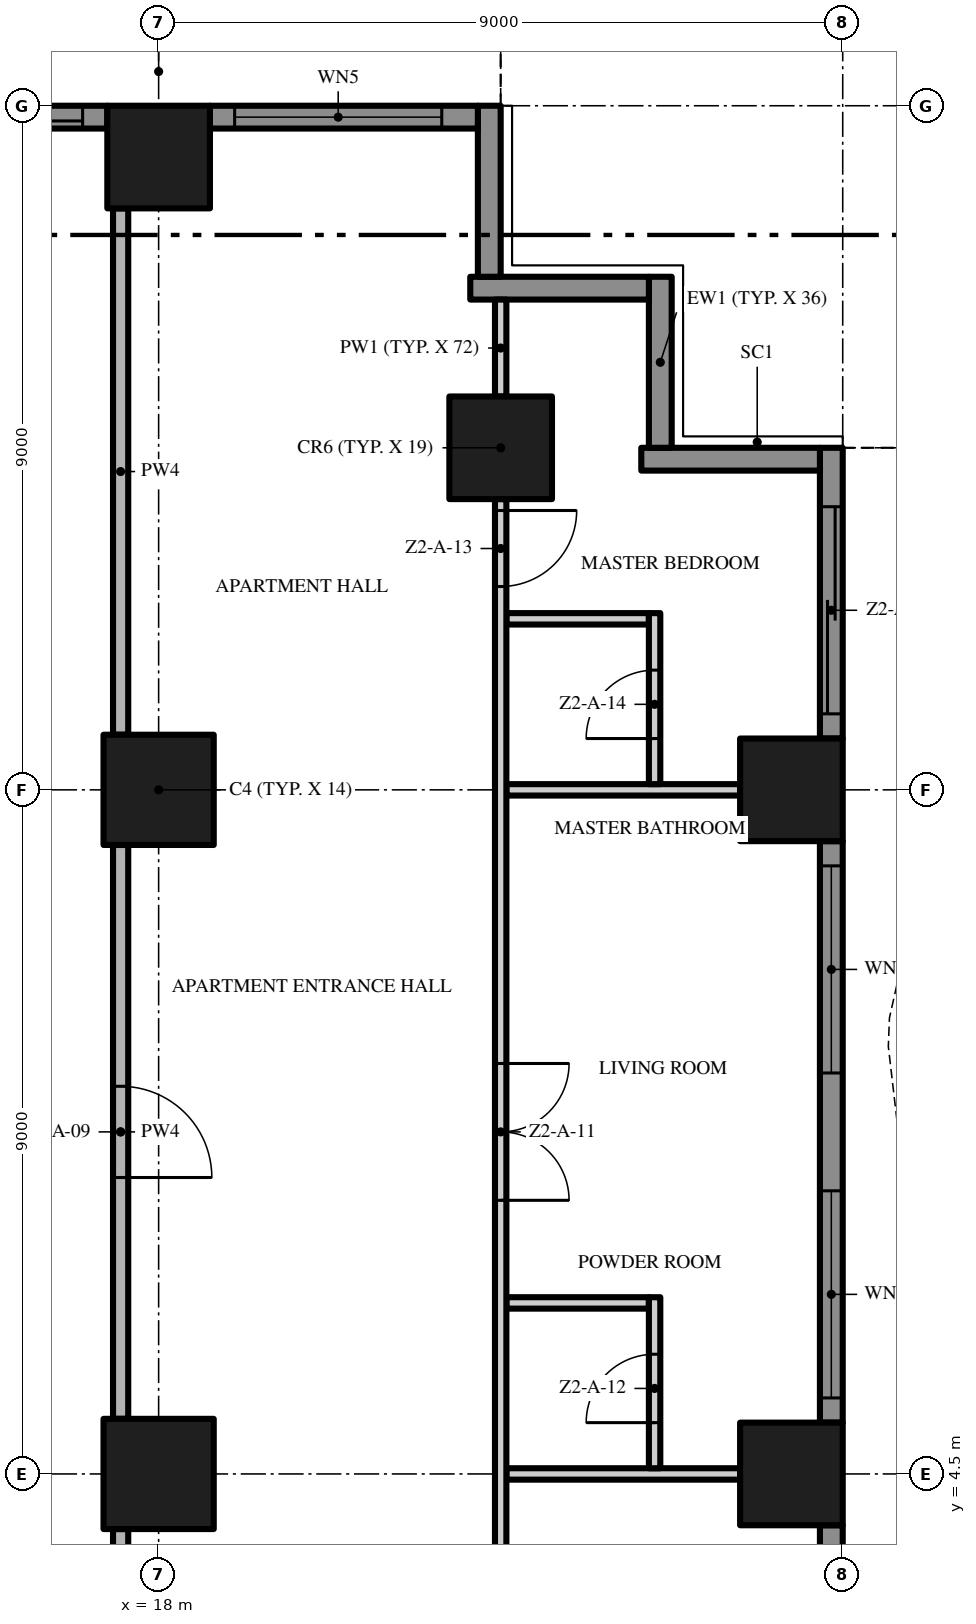
"""IFC4 building model, lengths in metres.
Left out: names, types, materials, properties, quantities, classifications, styles, units other than length and angle.
Written with IfcOpenShell. Run it as: python <this file> out.ifc"""

import sys

from ifc_helpers import new_model, si_unit, direction, frame, frame_2d, origin, origin_2d, place, context, subcontext, project, spatial, polyline, rectangle, outline, extrude, element, fill, save


model = new_model("IFC4")
c1 = context("Model", 3, precision=1e-05, world=origin(), true_north=direction((0.0, 1.0)))
c2 = subcontext(c1, "Body", "Model", "MODEL_VIEW")
j1 = project(units=[si_unit("LENGTHUNIT", "METRE"), si_unit("PLANEANGLEUNIT", "RADIAN")], contexts=[c1])
p1 = place(None, origin())
s1 = spatial("IfcSite", under=j1, at=p1, CompositionType="ELEMENT")
p2 = place(p1, origin())
s2 = spatial("IfcBuilding", under=s1, at=p2, CompositionType="ELEMENT")
p3 = place(p2, frame((0.0, 0.0, 73.2)))
s3 = spatial("IfcBuildingStorey", under=s2, at=p3, CompositionType="ELEMENT", Elevation=73.2)
p4 = place(p3, frame((18.0, 13.5, 0.0), z_axis=(0.0, 0.0, 1.0), x_axis=(1.0, 0.0, 0.0)))
e1 = element("IfcColumn", 1, at=p4, inside=s3, PredefinedType="COLUMN", context=c2, shape_type="SweptSolid", body=[
    extrude(rectangle(XDim=1.45, YDim=1.45, at=origin_2d()), origin(), (0.0, 0.0, 1.0), 3.5),
])
p5 = place(p3, frame((18.0, 21.825, 0.0), z_axis=(0.0, 0.0, 1.0), x_axis=(1.0, 0.0, 0.0)))
e2 = element("IfcColumn", 2, at=p5, inside=s3, PredefinedType="COLUMN", context=c2, shape_type="SweptSolid", body=[
    extrude(rectangle(XDim=1.35, YDim=1.35, at=origin_2d()), origin(), (0.0, 0.0, 1.0), 3.5),
])
p6 = place(p3, frame((18.0, 4.5, 0.0), z_axis=(0.0, 0.0, 1.0), x_axis=(1.0, 0.0, 0.0)))
e3 = element("IfcColumn", 3, at=p6, inside=s3, PredefinedType="COLUMN", context=c2, shape_type="SweptSolid", body=[
    extrude(rectangle(XDim=1.45, YDim=1.45, at=origin_2d()), origin(), (0.0, 0.0, 1.0), 3.5),
])
for number, where, z_axis, x_axis in (
    (4, (26.325, 13.5, 0.0), (0.0, 0.0, 1.0), (1.0, 0.0, 0.0)),
    (5, (22.5, 18.0, 0.0), (0.0, 0.0, 1.0), (1.0, 0.0, 0.0)),
    (6, (26.325, 4.5, 0.0), (0.0, 0.0, 1.0), (1.0, 0.0, 0.0)),
):
    element("IfcColumn", number, at=place(p3, frame(where, z_axis=z_axis, x_axis=x_axis)), inside=s3, PredefinedType="COLUMN", context=c2, shape_type="SweptSolid", body=[
        extrude(rectangle(XDim=1.35, YDim=1.35, at=origin_2d()), origin(), (0.0, 0.0, 1.0), 3.5),
    ])
p7 = place(p3, frame((26.85, 3.825, 0.0), z_axis=(0.0, 0.0, 1.0), x_axis=(0.0, -1.0, 0.0)))
e7 = element("IfcWall", 7, at=p7, inside=s3, PredefinedType="SOLIDWALL", context=c2, shape_type="SweptSolid", body=[
    extrude(rectangle(XDim=7.65, YDim=0.3, at=frame_2d((3.825, 0.0))), origin(), (0.0, 0.0, 1.0), 3.5),
])
p8 = place(p7, frame((4.6, 0.0, 0.45)))
e8 = element("IfcOpeningElement", 8, at=p8, cuts=e7, PredefinedType="OPENING", context=c2, shape_type="SweptSolid", body=[
    extrude(rectangle(XDim=2.725, YDim=2.65, at=frame_2d((1.363, 1.325))), frame((0.0, 0.16, 0.0), z_axis=(0.0, -1.0, 0.0), x_axis=(1.0, 0.0, 0.0)), (0.0, 0.0, 1.0), 0.32),
])
p9 = place(p7, frame((0.325, 0.0, 0.0)))
e9 = element("IfcOpeningElement", 9, at=p9, cuts=e7, PredefinedType="OPENING", context=c2, shape_type="SweptSolid", body=[
    extrude(rectangle(XDim=2.725, YDim=2.4, at=frame_2d((1.363, 1.2))), frame((0.0, 0.16, 0.0), z_axis=(0.0, -1.0, 0.0), x_axis=(1.0, 0.0, 0.0)), (0.0, 0.0, 1.0), 0.32),
])
p10 = place(p3, frame((26.85, 12.825, 0.0), z_axis=(0.0, 0.0, 1.0), x_axis=(0.0, -1.0, 0.0)))
e10 = element("IfcWall", 10, at=p10, inside=s3, PredefinedType="SOLIDWALL", context=c2, shape_type="SweptSolid", body=[
    extrude(rectangle(XDim=7.65, YDim=0.3, at=frame_2d((3.825, 0.0))), origin(), (0.0, 0.0, 1.0), 3.5),
])
p11 = place(p10, frame((4.6, 0.0, 0.45)))
e11 = element("IfcOpeningElement", 11, at=p11, cuts=e10, PredefinedType="OPENING", context=c2, shape_type="SweptSolid", body=[
    extrude(rectangle(XDim=2.725, YDim=2.65, at=frame_2d((1.363, 1.325))), frame((0.0, 0.16, 0.0), z_axis=(0.0, -1.0, 0.0), x_axis=(1.0, 0.0, 0.0)), (0.0, 0.0, 1.0), 0.32),
])
p12 = place(p10, frame((0.325, 0.0, 0.45)))
e12 = element("IfcOpeningElement", 12, at=p12, cuts=e10, PredefinedType="OPENING", context=c2, shape_type="SweptSolid", body=[
    extrude(rectangle(XDim=2.725, YDim=2.65, at=frame_2d((1.363, 1.325))), frame((0.0, 0.16, 0.0), z_axis=(0.0, -1.0, 0.0), x_axis=(1.0, 0.0, 0.0)), (0.0, 0.0, 1.0), 0.32),
])
p13 = place(p3, frame((26.85, 18.0, 0.0), z_axis=(0.0, 0.0, 1.0), x_axis=(0.0, -1.0, 0.0)))
e13 = element("IfcWall", 13, at=p13, inside=s3, PredefinedType="SOLIDWALL", context=c2, shape_type="SweptSolid", body=[
    extrude(rectangle(XDim=3.825, YDim=0.3, at=frame_2d((1.913, 0.0))), origin(), (0.0, 0.0, 1.0), 3.5),
])
p14 = place(p13, frame((0.775, 0.0, 0.0)))
e14 = element("IfcOpeningElement", 14, at=p14, cuts=e13, PredefinedType="OPENING", context=c2, shape_type="SweptSolid", body=[
    extrude(rectangle(XDim=2.725, YDim=2.4, at=frame_2d((1.363, 1.2))), frame((0.0, 0.16, 0.0), z_axis=(0.0, -1.0, 0.0), x_axis=(1.0, 0.0, 0.0)), (0.0, 0.0, 1.0), 0.32),
])
p15 = place(p3, frame((24.35, 17.85, 0.0), z_axis=(0.0, 0.0, 1.0), x_axis=(1.0, 0.0, 0.0)))
e15 = element("IfcWall", 15, at=p15, inside=s3, PredefinedType="SOLIDWALL", context=c2, shape_type="SweptSolid", body=[
    extrude(rectangle(XDim=2.35, YDim=0.3, at=frame_2d((1.175, 0.0))), origin(), (0.0, 0.0, 1.0), 3.5),
])
p16 = place(p3, frame((24.6, 20.25, 0.0), z_axis=(0.0, 0.0, 1.0), x_axis=(0.0, -1.0, 0.0)))
e16 = element("IfcWall", 16, at=p16, inside=s3, PredefinedType="SOLIDWALL", context=c2, shape_type="SweptSolid", body=[
    extrude(rectangle(XDim=2.25, YDim=0.3, at=frame_2d((1.125, 0.0))), origin(), (0.0, 0.0, 1.0), 3.5),
])
p17 = place(p3, frame((22.1, 20.1, 0.0), z_axis=(0.0, 0.0, 1.0), x_axis=(1.0, 0.0, 0.0)))
e17 = element("IfcWall", 17, at=p17, inside=s3, PredefinedType="SOLIDWALL", context=c2, shape_type="SweptSolid", body=[
    extrude(rectangle(XDim=2.35, YDim=0.3, at=frame_2d((1.175, 0.0))), origin(), (0.0, 0.0, 1.0), 3.5),
])
p18 = place(p3, frame((22.35, 22.5, 0.0), z_axis=(0.0, 0.0, 1.0), x_axis=(0.0, -1.0, 0.0)))
e18 = element("IfcWall", 18, at=p18, inside=s3, PredefinedType="SOLIDWALL", context=c2, shape_type="SweptSolid", body=[
    extrude(rectangle(XDim=2.25, YDim=0.3, at=frame_2d((1.125, 0.0))), origin(), (0.0, 0.0, 1.0), 3.5),
])
p19 = place(p3, frame((18.675, 22.35, 0.0), z_axis=(0.0, 0.0, 1.0), x_axis=(1.0, 0.0, 0.0)))
e19 = element("IfcWall", 19, at=p19, inside=s3, PredefinedType="SOLIDWALL", context=c2, shape_type="SweptSolid", body=[
    extrude(rectangle(XDim=3.525, YDim=0.3, at=frame_2d((1.762, 0.0))), origin(), (0.0, 0.0, 1.0), 3.5),
])
p20 = place(p19, frame((0.325, 0.0, 0.45)))
e20 = element("IfcOpeningElement", 20, at=p20, cuts=e19, PredefinedType="OPENING", context=c2, shape_type="SweptSolid", body=[
    extrude(rectangle(XDim=2.725, YDim=2.65, at=frame_2d((1.363, 1.325))), frame((0.0, 0.16, 0.0), z_axis=(0.0, -1.0, 0.0), x_axis=(1.0, 0.0, 0.0)), (0.0, 0.0, 1.0), 0.32),
])
p21 = place(p3, frame((13.5, 22.35, 0.0), z_axis=(0.0, 0.0, 1.0), x_axis=(1.0, 0.0, 0.0)))
e21 = element("IfcWall", 21, at=p21, inside=s3, PredefinedType="SOLIDWALL", context=c2, shape_type="SweptSolid", body=[
    extrude(rectangle(XDim=3.825, YDim=0.3, at=frame_2d((1.913, 0.0))), origin(), (0.0, 0.0, 1.0), 3.5),
])
p22 = place(p21, frame((0.775, 0.0, 0.0)))
e22 = element("IfcOpeningElement", 22, at=p22, cuts=e21, PredefinedType="OPENING", context=c2, shape_type="SweptSolid", body=[
    extrude(rectangle(XDim=2.725, YDim=2.4, at=frame_2d((1.363, 1.2))), frame((0.0, 0.16, 0.0), z_axis=(0.0, -1.0, 0.0), x_axis=(1.0, 0.0, 0.0)), (0.0, 0.0, 1.0), 0.32),
])
p23 = place(p3, origin())
e23 = element("IfcWall", 23, at=p23, inside=s3, PredefinedType="USERDEFINED", context=c2, shape_type="SweptSolid", body=[
    extrude(outline(polyline([(27.951, -18.0), (28.612, -16.5), (29.345, -15.0), (29.869, -13.5), (30.0, -12.375), (29.985, -12.0), (29.649, -10.5), (28.988, -9.0), (28.255, -7.5), (27.731, -6.0), (27.6, -4.875), (27.615, -4.5), (27.951, -3.0), (28.612, -1.5), (29.345, 0.0), (29.869, 1.5), (30.0, 2.625), (29.985, 3.0), (29.649, 4.5), (28.988, 6.0), (28.255, 7.5), (27.731, 9.0), (27.6, 10.125), (27.615, 10.5), (27.951, 12.0), (28.612, 13.5), (29.345, 15.0), (29.869, 16.5), (30.0, 17.625), (29.985, 18.0), (29.735, 17.99), (29.749, 17.635), (29.624, 16.556), (29.114, 15.096), (28.385, 13.605), (27.713, 12.079), (27.366, 10.533), (27.349, 10.115), (27.486, 8.944), (28.024, 7.404), (28.761, 5.895), (29.41, 4.421), (29.736, 2.967), (29.749, 2.635), (29.624, 1.556), (29.114, 0.096), (28.385, -1.395), (27.713, -2.921), (27.366, -4.467), (27.349, -4.885), (27.486, -6.056), (28.024, -7.596), (28.761, -9.105), (29.41, -10.579), (29.736, -12.033), (29.749, -12.365), (29.624, -13.444), (29.114, -14.904), (28.385, -16.395), (27.723, -17.899), (27.951, -18.0)])), origin(), (0.0, 0.0, 1.0), 0.9),
])
p24 = place(p3, frame((22.575, 4.5, 0.0), z_axis=(0.0, 0.0, 1.0), x_axis=(1.0, 0.0, 0.0)))
e24 = element("IfcWall", 24, at=p24, inside=s3, PredefinedType="PARTITIONING", context=c2, shape_type="SweptSolid", body=[
    extrude(rectangle(XDim=3.075, YDim=0.15, at=frame_2d((1.538, 0.0))), origin(), (0.0, 0.0, 1.0), 3.5),
])
p25 = place(p3, frame((22.575, 6.75, 0.0), z_axis=(0.0, 0.0, 1.0), x_axis=(1.0, 0.0, 0.0)))
e25 = element("IfcWall", 25, at=p25, inside=s3, PredefinedType="PARTITIONING", context=c2, shape_type="SweptSolid", body=[
    extrude(rectangle(XDim=1.875, YDim=0.15, at=frame_2d((0.938, 0.0))), origin(), (0.0, 0.0, 1.0), 3.5),
])
p26 = place(p3, frame((22.575, 13.5, 0.0), z_axis=(0.0, 0.0, 1.0), x_axis=(1.0, 0.0, 0.0)))
e26 = element("IfcWall", 26, at=p26, inside=s3, PredefinedType="PARTITIONING", context=c2, shape_type="SweptSolid", body=[
    extrude(rectangle(XDim=3.075, YDim=0.15, at=frame_2d((1.538, 0.0))), origin(), (0.0, 0.0, 1.0), 3.5),
])
p27 = place(p3, frame((22.575, 15.75, 0.0), z_axis=(0.0, 0.0, 1.0), x_axis=(1.0, 0.0, 0.0)))
e27 = element("IfcWall", 27, at=p27, inside=s3, PredefinedType="PARTITIONING", context=c2, shape_type="SweptSolid", body=[
    extrude(rectangle(XDim=1.875, YDim=0.15, at=frame_2d((0.938, 0.0))), origin(), (0.0, 0.0, 1.0), 3.5),
])
p28 = place(p3, frame((17.5, -0.2, 0.0), z_axis=(0.0, 0.0, 1.0), x_axis=(0.0, 1.0, 0.0)))
e28 = element("IfcWall", 28, at=p28, inside=s3, PredefinedType="PARTITIONING", context=c2, shape_type="SweptSolid", body=[
    extrude(rectangle(XDim=3.975, YDim=0.2, at=frame_2d((1.988, 0.0))), origin(), (0.0, 0.0, 1.0), 3.5),
])
p29 = place(p3, frame((17.5, 12.775, 0.0), z_axis=(0.0, 0.0, 1.0), x_axis=(0.0, -1.0, 0.0)))
e29 = element("IfcWall", 29, at=p29, inside=s3, PredefinedType="PARTITIONING", context=c2, shape_type="SweptSolid", body=[
    extrude(rectangle(XDim=7.55, YDim=0.2, at=frame_2d((3.775, 0.0))), origin(), (0.0, 0.0, 1.0), 3.5),
])
p30 = place(p29, frame((3.175, 0.0, 0.0)))
e30 = element("IfcOpeningElement", 30, at=p30, cuts=e29, PredefinedType="OPENING", context=c2, shape_type="SweptSolid", body=[
    extrude(rectangle(XDim=1.2, YDim=2.4, at=frame_2d((0.6, 1.2))), frame((0.0, 0.11, 0.0), z_axis=(0.0, -1.0, 0.0), x_axis=(1.0, 0.0, 0.0)), (0.0, 0.0, 1.0), 0.22),
])
p31 = place(p3, frame((17.5, 14.225, 0.0), z_axis=(0.0, 0.0, 1.0), x_axis=(0.0, 1.0, 0.0)))
e31 = element("IfcWall", 31, at=p31, inside=s3, PredefinedType="PARTITIONING", context=c2, shape_type="SweptSolid", body=[
    extrude(rectangle(XDim=6.925, YDim=0.2, at=frame_2d((3.462, 0.0))), origin(), (0.0, 0.0, 1.0), 3.5),
])
p32 = place(p3, frame((22.5, 17.325, 0.0), z_axis=(0.0, 0.0, 1.0), x_axis=(0.0, -1.0, 0.0)))
e32 = element("IfcWall", 32, at=p32, inside=s3, PredefinedType="PARTITIONING", context=c2, shape_type="SweptSolid", body=[
    extrude(rectangle(XDim=17.225, YDim=0.15, at=frame_2d((8.613, 0.0))), origin(), (0.0, 0.0, 1.0), 3.5),
])
p33 = place(p32, frame((14.575, 0.0, 0.0)))
e33 = element("IfcOpeningElement", 33, at=p33, cuts=e32, PredefinedType="OPENING", context=c2, shape_type="SweptSolid", body=[
    extrude(rectangle(XDim=1.0, YDim=2.4, at=frame_2d((0.5, 1.2))), frame((0.0, 0.085, 0.0), z_axis=(0.0, -1.0, 0.0), x_axis=(1.0, 0.0, 0.0)), (0.0, 0.0, 1.0), 0.17),
])
p34 = place(p32, frame((7.425, 0.0, 0.0)))
e34 = element("IfcOpeningElement", 34, at=p34, cuts=e32, PredefinedType="OPENING", context=c2, shape_type="SweptSolid", body=[
    extrude(rectangle(XDim=1.8, YDim=2.4, at=frame_2d((0.9, 1.2))), frame((0.0, 0.085, 0.0), z_axis=(0.0, -1.0, 0.0), x_axis=(1.0, 0.0, 0.0)), (0.0, 0.0, 1.0), 0.17),
])
p35 = place(p32, frame((0.15, 0.0, 0.0)))
e35 = element("IfcOpeningElement", 35, at=p35, cuts=e32, PredefinedType="OPENING", context=c2, shape_type="SweptSolid", body=[
    extrude(rectangle(XDim=1.0, YDim=2.4, at=frame_2d((0.5, 1.2))), frame((0.0, 0.085, 0.0), z_axis=(0.0, -1.0, 0.0), x_axis=(1.0, 0.0, 0.0)), (0.0, 0.0, 1.0), 0.17),
])
p36 = place(p3, frame((22.5, 18.675, 0.0), z_axis=(0.0, 0.0, 1.0), x_axis=(0.0, 1.0, 0.0)))
e36 = element("IfcWall", 36, at=p36, inside=s3, PredefinedType="PARTITIONING", context=c2, shape_type="SweptSolid", body=[
    extrude(rectangle(XDim=1.275, YDim=0.15, at=frame_2d((0.637, 0.0))), origin(), (0.0, 0.0, 1.0), 3.5),
])
p37 = place(p3, frame((24.525, 4.575, 0.0), z_axis=(0.0, 0.0, 1.0), x_axis=(0.0, 1.0, 0.0)))
e37 = element("IfcWall", 37, at=p37, inside=s3, PredefinedType="PARTITIONING", context=c2, shape_type="SweptSolid", body=[
    extrude(rectangle(XDim=2.25, YDim=0.15, at=frame_2d((1.125, 0.0))), origin(), (0.0, 0.0, 1.0), 3.5),
])
p38 = place(p37, frame((0.6, 0.0, 0.0)))
e38 = element("IfcOpeningElement", 38, at=p38, cuts=e37, PredefinedType="OPENING", context=c2, shape_type="SweptSolid", body=[
    extrude(rectangle(XDim=0.9, YDim=2.1, at=frame_2d((0.45, 1.05))), frame((0.0, 0.085, 0.0), z_axis=(0.0, -1.0, 0.0), x_axis=(1.0, 0.0, 0.0)), (0.0, 0.0, 1.0), 0.17),
])
p39 = place(p3, frame((24.525, 13.575, 0.0), z_axis=(0.0, 0.0, 1.0), x_axis=(0.0, 1.0, 0.0)))
e39 = element("IfcWall", 39, at=p39, inside=s3, PredefinedType="PARTITIONING", context=c2, shape_type="SweptSolid", body=[
    extrude(rectangle(XDim=2.25, YDim=0.15, at=frame_2d((1.125, 0.0))), origin(), (0.0, 0.0, 1.0), 3.5),
])
p40 = place(p39, frame((0.6, 0.0, 0.0)))
e40 = element("IfcOpeningElement", 40, at=p40, cuts=e39, PredefinedType="OPENING", context=c2, shape_type="SweptSolid", body=[
    extrude(rectangle(XDim=0.9, YDim=2.1, at=frame_2d((0.45, 1.05))), frame((0.0, 0.085, 0.0), z_axis=(0.0, -1.0, 0.0), x_axis=(1.0, 0.0, 0.0)), (0.0, 0.0, 1.0), 0.17),
])
p41 = place(p11, origin())
e41 = element("IfcWindow", 41, at=p41, inside=s3, PartitioningType="SINGLE_PANEL", PredefinedType="WINDOW", context=c2, shape_type="SweptSolid", body=[
    extrude(rectangle(XDim=2.725, YDim=2.65, at=frame_2d((1.363, 1.325))), frame((0.0, 0.03, 0.0), z_axis=(0.0, -1.0, 0.0), x_axis=(1.0, 0.0, 0.0)), (0.0, 0.0, 1.0), 0.06),
])
fill(e11, e41)
p42 = place(p12, origin())
e42 = element("IfcWindow", 42, at=p42, inside=s3, PartitioningType="SINGLE_PANEL", PredefinedType="WINDOW", context=c2, shape_type="SweptSolid", body=[
    extrude(rectangle(XDim=2.725, YDim=2.65, at=frame_2d((1.363, 1.325))), frame((0.0, 0.03, 0.0), z_axis=(0.0, -1.0, 0.0), x_axis=(1.0, 0.0, 0.0)), (0.0, 0.0, 1.0), 0.06),
])
fill(e12, e42)
p43 = place(p14, origin())
e43 = element("IfcDoor", 43, at=p43, inside=s3, OperationType="SINGLE_SWING_LEFT", PredefinedType="DOOR", context=c2, shape_type="SweptSolid", body=[
    extrude(rectangle(XDim=2.725, YDim=2.4, at=frame_2d((1.363, 1.2))), frame((0.0, 0.025, 0.0), z_axis=(0.0, -1.0, 0.0), x_axis=(1.0, 0.0, 0.0)), (0.0, 0.0, 1.0), 0.05),
])
fill(e14, e43)
p44 = place(p20, origin())
e44 = element("IfcWindow", 44, at=p44, inside=s3, PartitioningType="SINGLE_PANEL", PredefinedType="WINDOW", context=c2, shape_type="SweptSolid", body=[
    extrude(rectangle(XDim=2.725, YDim=2.65, at=frame_2d((1.363, 1.325))), frame((0.0, 0.03, 0.0), z_axis=(0.0, -1.0, 0.0), x_axis=(1.0, 0.0, 0.0)), (0.0, 0.0, 1.0), 0.06),
])
fill(e20, e44)
p45 = place(p22, origin())
e45 = element("IfcDoor", 45, at=p45, inside=s3, OperationType="SINGLE_SWING_LEFT", PredefinedType="DOOR", context=c2, shape_type="SweptSolid", body=[
    extrude(rectangle(XDim=2.725, YDim=2.4, at=frame_2d((1.363, 1.2))), frame((0.0, 0.025, 0.0), z_axis=(0.0, -1.0, 0.0), x_axis=(1.0, 0.0, 0.0)), (0.0, 0.0, 1.0), 0.05),
])
fill(e22, e45)
p46 = place(p30, origin())
e46 = element("IfcDoor", 46, at=p46, inside=s3, OperationType="SINGLE_SWING_RIGHT", PredefinedType="DOOR", context=c2, shape_type="SweptSolid", body=[
    extrude(rectangle(XDim=1.2, YDim=2.4, at=frame_2d((0.6, 1.2))), frame((0.0, 0.025, 0.0), z_axis=(0.0, -1.0, 0.0), x_axis=(1.0, 0.0, 0.0)), (0.0, 0.0, 1.0), 0.05),
])
fill(e30, e46)
p47 = place(p34, origin())
e47 = element("IfcDoor", 47, at=p47, inside=s3, OperationType="DOUBLE_DOOR_SINGLE_SWING", PredefinedType="DOOR", context=c2, shape_type="SweptSolid", body=[
    extrude(rectangle(XDim=1.8, YDim=2.4, at=frame_2d((0.9, 1.2))), frame((0.0, 0.025, 0.0), z_axis=(0.0, -1.0, 0.0), x_axis=(1.0, 0.0, 0.0)), (0.0, 0.0, 1.0), 0.05),
])
fill(e34, e47)
p48 = place(p38, origin())
e48 = element("IfcDoor", 48, at=p48, inside=s3, OperationType="SINGLE_SWING_LEFT", PredefinedType="DOOR", context=c2, shape_type="SweptSolid", body=[
    extrude(rectangle(XDim=0.9, YDim=2.1, at=frame_2d((0.45, 1.05))), frame((0.0, 0.025, 0.0), z_axis=(0.0, -1.0, 0.0), x_axis=(1.0, 0.0, 0.0)), (0.0, 0.0, 1.0), 0.05),
])
fill(e38, e48)
p49 = place(p35, origin())
e49 = element("IfcDoor", 49, at=p49, inside=s3, OperationType="SINGLE_SWING_LEFT", PredefinedType="DOOR", context=c2, shape_type="SweptSolid", body=[
    extrude(rectangle(XDim=1.0, YDim=2.4, at=frame_2d((0.5, 1.2))), frame((0.0, 0.025, 0.0), z_axis=(0.0, -1.0, 0.0), x_axis=(1.0, 0.0, 0.0)), (0.0, 0.0, 1.0), 0.05),
])
fill(e35, e49)
p50 = place(p40, origin())
e50 = element("IfcDoor", 50, at=p50, inside=s3, OperationType="SINGLE_SWING_LEFT", PredefinedType="DOOR", context=c2, shape_type="SweptSolid", body=[
    extrude(rectangle(XDim=0.9, YDim=2.1, at=frame_2d((0.45, 1.05))), frame((0.0, 0.025, 0.0), z_axis=(0.0, -1.0, 0.0), x_axis=(1.0, 0.0, 0.0)), (0.0, 0.0, 1.0), 0.05),
])
fill(e40, e50)
save(model, sys.argv[1])
